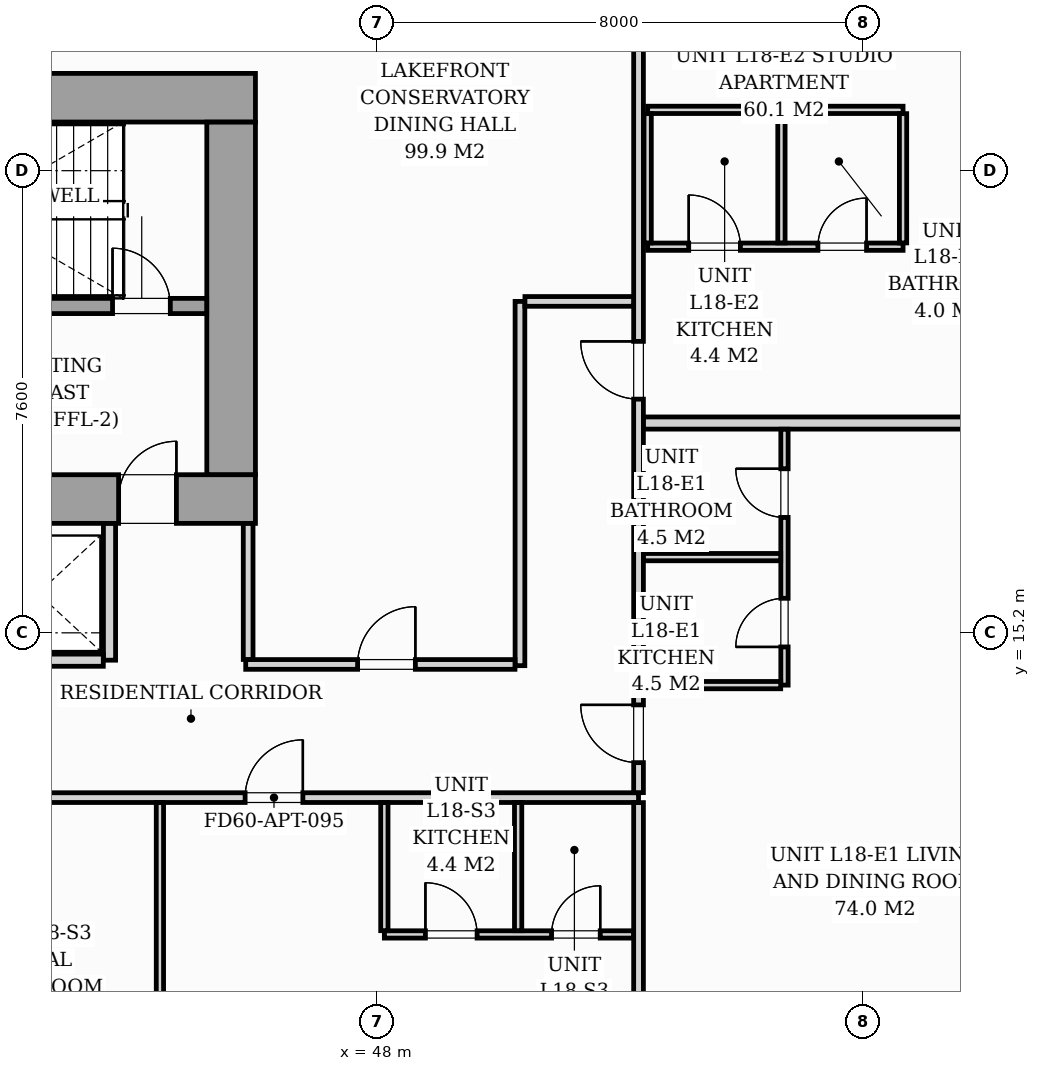
"""IFC4 building model, lengths in metres.
Left out: names, types, materials, properties, quantities, classifications, styles, units other than length and angle.
Written with IfcOpenShell. Run it as: python <this file> out.ifc"""

import sys

from ifc_helpers import new_model, si_unit, direction, frame, frame_2d, origin, origin_2d, place, context, subcontext, project, spatial, rectangle, i_section, extrude, source, transform, mapped, element, fill, save


model = new_model("IFC4")
c1 = context("Model", 3, precision=1e-05, world=origin(), true_north=direction((0.0, 1.0)))
c2 = subcontext(c1, "Body", "Model", "MODEL_VIEW")
j1 = project(units=[si_unit("LENGTHUNIT", "METRE"), si_unit("PLANEANGLEUNIT", "RADIAN")], contexts=[c1])
p1 = place(None, origin())
s1 = spatial("IfcSite", under=j1, at=p1, CompositionType="ELEMENT")
p2 = place(p1, origin())
s2 = spatial("IfcBuilding", under=s1, at=p2, CompositionType="ELEMENT")
p3 = place(p2, frame((0.0, 0.0, 64.6)))
s3 = spatial("IfcBuildingStorey", under=s2, at=p3, CompositionType="ELEMENT", Elevation=64.6)
m1 = source(origin(), c2, "Body", "SweptSolid", [
    extrude(i_section(OverallWidth=0.437, OverallDepth=0.514, WebThickness=0.061, FlangeThickness=0.097, FilletRadius=0.018, at=origin_2d()), origin(), (0.0, 0.0, 1.0), 3.196),
])
for number, where, z_axis, x_axis in (
    (1, (45.6, 17.4, 0.002), (0.0, 0.0, 1.0), (1.0, 0.0, 0.0)),
    (2, (45.6, 24.0, 0.002), (0.0, 0.0, 1.0), (1.0, 0.0, 0.0)),
):
    element("IfcColumn", number, at=place(p3, frame(where, z_axis=z_axis, x_axis=x_axis)), inside=s3, PredefinedType="PILASTER", context=c2, shape_type="MappedRepresentation", body=[
        mapped(m1, transform((0.0, 0.0, 0.0), scale=1.0)),
    ])
p4 = place(p3, frame((26.0, 17.4, 0.0), z_axis=(0.0, 0.0, 1.0), x_axis=(1.0, 0.0, 0.0)))
e3 = element("IfcWall", 3, at=p4, inside=s3, PredefinedType="SHEAR", context=c2, shape_type="SweptSolid", body=[
    extrude(rectangle(XDim=20.0, YDim=0.8, at=frame_2d((10.0, 0.0))), origin(), (0.0, 0.0, 1.0), 3.2),
])
p5 = place(p4, frame((1.15, 0.0, 0.0)))
e4 = element("IfcOpeningElement", 4, at=p5, cuts=e3, PredefinedType="OPENING", context=c2, shape_type="SweptSolid", body=[
    extrude(rectangle(XDim=0.95, YDim=2.06, at=frame_2d((0.475, 1.03))), frame((0.0, 0.41, 0.0), z_axis=(0.0, -1.0, 0.0), x_axis=(1.0, 0.0, 0.0)), (0.0, 0.0, 1.0), 0.82),
])
p6 = place(p4, frame((9.58, 0.0, 0.0)))
e5 = element("IfcOpeningElement", 5, at=p6, cuts=e3, PredefinedType="OPENING", context=c2, shape_type="SweptSolid", body=[
    extrude(rectangle(XDim=0.85, YDim=2.0, at=frame_2d((0.425, 1.0))), frame((0.0, 0.41, 0.0), z_axis=(0.0, -1.0, 0.0), x_axis=(1.0, 0.0, 0.0)), (0.0, 0.0, 1.0), 0.82),
])
p7 = place(p4, frame((17.75, 0.0, 0.0)))
e6 = element("IfcOpeningElement", 6, at=p7, cuts=e3, PredefinedType="OPENING", context=c2, shape_type="SweptSolid", body=[
    extrude(rectangle(XDim=0.95, YDim=2.06, at=frame_2d((0.475, 1.03))), frame((0.0, 0.41, 0.0), z_axis=(0.0, -1.0, 0.0), x_axis=(1.0, 0.0, 0.0)), (0.0, 0.0, 1.0), 0.82),
])
p8 = place(p3, frame((26.0, 24.0, 0.0), z_axis=(0.0, 0.0, 1.0), x_axis=(1.0, 0.0, 0.0)))
e7 = element("IfcWall", 7, at=p8, inside=s3, PredefinedType="SHEAR", context=c2, shape_type="SweptSolid", body=[
    extrude(rectangle(XDim=20.0, YDim=0.8, at=frame_2d((10.0, 0.0))), origin(), (0.0, 0.0, 1.0), 3.2),
])
p9 = place(p3, frame((45.6, 17.802, 0.0), z_axis=(0.0, 0.0, 1.0), x_axis=(0.0, 1.0, 0.0)))
e8 = element("IfcWall", 8, at=p9, inside=s3, PredefinedType="SHEAR", context=c2, shape_type="SweptSolid", body=[
    extrude(rectangle(XDim=5.796, YDim=0.8, at=frame_2d((2.898, 0.0))), origin(), (0.0, 0.0, 1.0), 3.2),
])
p10 = place(p3, frame((37.05, 20.575, 0.0), z_axis=(0.0, 0.0, 1.0), x_axis=(1.0, 0.0, 0.0)))
e9 = element("IfcWall", 9, at=p10, inside=s3, PredefinedType="SOLIDWALL", context=c2, shape_type="SweptSolid", body=[
    extrude(rectangle(XDim=8.148, YDim=0.25, at=frame_2d((4.074, 0.0))), origin(), (0.0, 0.0, 1.0), 3.2),
])
p11 = place(p10, frame((6.6, 0.0, 0.0)))
e10 = element("IfcOpeningElement", 10, at=p11, cuts=e9, PredefinedType="OPENING", context=c2, shape_type="SweptSolid", body=[
    extrude(rectangle(XDim=0.95, YDim=2.06, at=frame_2d((0.475, 1.03))), frame((0.0, 0.135, 0.0), z_axis=(0.0, -1.0, 0.0), x_axis=(1.0, 0.0, 0.0)), (0.0, 0.0, 1.0), 0.27),
])
p12 = place(p3, frame((43.6, 14.75, 0.0), z_axis=(0.0, 0.0, 1.0), x_axis=(0.0, 1.0, 0.0)))
e11 = element("IfcWall", 11, at=p12, inside=s3, PredefinedType="PARTITIONING", context=c2, shape_type="SweptSolid", body=[
    extrude(rectangle(XDim=2.248, YDim=0.2, at=frame_2d((1.124, 0.0))), origin(), (0.0, 0.0, 1.0), 2.9),
])
p13 = place(p3, frame((41.352, 14.75, 0.0), z_axis=(0.0, 0.0, 1.0), x_axis=(1.0, 0.0, 0.0)))
e12 = element("IfcWall", 12, at=p13, inside=s3, PredefinedType="PARTITIONING", context=c2, shape_type="SweptSolid", body=[
    extrude(rectangle(XDim=2.146, YDim=0.2, at=frame_2d((1.073, 0.0))), origin(), (0.0, 0.0, 1.0), 2.9),
])
p14 = place(p3, frame((15.2, 12.49, 0.0), z_axis=(0.0, 0.0, 1.0), x_axis=(1.0, 0.0, 0.0)))
e13 = element("IfcWall", 13, at=p14, inside=s3, PredefinedType="PARTITIONING", context=c2, shape_type="SweptSolid", body=[
    extrude(rectangle(XDim=37.1, YDim=0.16, at=frame_2d((18.55, 0.0))), origin(), (0.0, 0.0, 1.0), 2.9),
])
p15 = place(p14, frame((5.863, 0.0, 0.0)))
e14 = element("IfcOpeningElement", 14, at=p15, cuts=e13, PredefinedType="OPENING", context=c2, shape_type="SweptSolid", body=[
    extrude(rectangle(XDim=0.95, YDim=2.06, at=frame_2d((0.475, 1.03))), frame((0.0, 0.09, 0.0), z_axis=(0.0, -1.0, 0.0), x_axis=(1.0, 0.0, 0.0)), (0.0, 0.0, 1.0), 0.18),
])
p16 = place(p14, frame((18.25, 0.0, 0.0)))
e15 = element("IfcOpeningElement", 15, at=p16, cuts=e13, PredefinedType="OPENING", context=c2, shape_type="SweptSolid", body=[
    extrude(rectangle(XDim=0.95, YDim=2.06, at=frame_2d((0.475, 1.03))), frame((0.0, 0.09, 0.0), z_axis=(0.0, -1.0, 0.0), x_axis=(1.0, 0.0, 0.0)), (0.0, 0.0, 1.0), 0.18),
])
p17 = place(p14, frame((30.63, 0.0, 0.0)))
e16 = element("IfcOpeningElement", 16, at=p17, cuts=e13, PredefinedType="OPENING", context=c2, shape_type="SweptSolid", body=[
    extrude(rectangle(XDim=0.95, YDim=2.06, at=frame_2d((0.475, 1.03))), frame((0.0, 0.09, 0.0), z_axis=(0.0, -1.0, 0.0), x_axis=(1.0, 0.0, 0.0)), (0.0, 0.0, 1.0), 0.18),
])
p18 = place(p3, frame((52.3, 2.962, 0.0), z_axis=(0.0, 0.0, 1.0), x_axis=(0.0, 1.0, 0.0)))
e17 = element("IfcWall", 17, at=p18, inside=s3, PredefinedType="PARTITIONING", context=c2, shape_type="SweptSolid", body=[
    extrude(rectangle(XDim=9.446, YDim=0.16, at=frame_2d((4.723, 0.0))), origin(), (0.0, 0.0, 1.0), 2.9),
])
p19 = place(p3, frame((52.3, 12.572, 0.0), z_axis=(0.0, 0.0, 1.0), x_axis=(0.0, 1.0, 0.0)))
e18 = element("IfcWall", 18, at=p19, inside=s3, PredefinedType="PARTITIONING", context=c2, shape_type="SweptSolid", body=[
    extrude(rectangle(XDim=14.866, YDim=0.16, at=frame_2d((7.433, 0.0))), origin(), (0.0, 0.0, 1.0), 2.9),
])
p20 = place(p19, frame((0.493, 0.0, 0.0)))
e19 = element("IfcOpeningElement", 19, at=p20, cuts=e18, PredefinedType="OPENING", context=c2, shape_type="SweptSolid", body=[
    extrude(rectangle(XDim=0.95, YDim=2.06, at=frame_2d((0.475, 1.03))), frame((0.0, 0.09, 0.0), z_axis=(0.0, -1.0, 0.0), x_axis=(1.0, 0.0, 0.0)), (0.0, 0.0, 1.0), 0.18),
])
p21 = place(p19, frame((6.471, 0.0, 0.0)))
e20 = element("IfcOpeningElement", 20, at=p21, cuts=e18, PredefinedType="OPENING", context=c2, shape_type="SweptSolid", body=[
    extrude(rectangle(XDim=0.95, YDim=2.06, at=frame_2d((0.475, 1.03))), frame((0.0, 0.09, 0.0), z_axis=(0.0, -1.0, 0.0), x_axis=(1.0, 0.0, 0.0)), (0.0, 0.0, 1.0), 0.18),
])
p22 = place(p3, frame((48.12, 10.24, 0.0), z_axis=(0.0, 0.0, 1.0), x_axis=(1.0, 0.0, 0.0)))
e21 = element("IfcWall", 21, at=p22, inside=s3, PredefinedType="PARTITIONING", context=c2, shape_type="SweptSolid", body=[
    extrude(rectangle(XDim=4.098, YDim=0.12, at=frame_2d((2.049, 0.0))), origin(), (0.0, 0.0, 1.0), 2.9),
])
p23 = place(p22, frame((0.675, 0.0, 0.0)))
e22 = element("IfcOpeningElement", 22, at=p23, cuts=e21, PredefinedType="OPENING", context=c2, shape_type="SweptSolid", body=[
    extrude(rectangle(XDim=0.85, YDim=2.05, at=frame_2d((0.425, 1.025))), frame((0.0, 0.07, 0.0), z_axis=(0.0, -1.0, 0.0), x_axis=(1.0, 0.0, 0.0)), (0.0, 0.0, 1.0), 0.14),
])
p24 = place(p22, frame((2.75, 0.0, 0.0)))
e23 = element("IfcOpeningElement", 23, at=p24, cuts=e21, PredefinedType="OPENING", context=c2, shape_type="SweptSolid", body=[
    extrude(rectangle(XDim=0.8, YDim=2.02, at=frame_2d((0.4, 1.01))), frame((0.0, 0.07, 0.0), z_axis=(0.0, -1.0, 0.0), x_axis=(1.0, 0.0, 0.0)), (0.0, 0.0, 1.0), 0.14),
])
for number, where, z_axis, x_axis in (
    (24, (48.12, 10.302, 0.0), (0.0, 0.0, 1.0), (0.0, 1.0, 0.0)),
    (25, (50.32, 10.302, 0.0), (0.0, 0.0, 1.0), (0.0, 1.0, 0.0)),
):
    element("IfcWall", number, at=place(p3, frame(where, z_axis=z_axis, x_axis=x_axis)), inside=s3, PredefinedType="PARTITIONING", context=c2, shape_type="SweptSolid", body=[
        extrude(rectangle(XDim=2.106, YDim=0.12, at=frame_2d((1.053, 0.0))), origin(), (0.0, 0.0, 1.0), 2.9),
    ])
p25 = place(p3, frame((44.429, 2.962, 0.0), z_axis=(0.0, 0.0, 1.0), x_axis=(0.0, 1.0, 0.0)))
e26 = element("IfcWall", 26, at=p25, inside=s3, PredefinedType="PARTITIONING", context=c2, shape_type="SweptSolid", body=[
    extrude(rectangle(XDim=9.446, YDim=0.12, at=frame_2d((4.723, 0.0))), origin(), (0.0, 0.0, 1.0), 2.096),
])
p26 = place(p25, frame((4.288, 0.0, 0.0)))
e27 = element("IfcOpeningElement", 27, at=p26, cuts=e26, PredefinedType="OPENING", context=c2, shape_type="SweptSolid", body=[
    extrude(rectangle(XDim=0.85, YDim=2.01, at=frame_2d((0.425, 1.005))), frame((0.0, 0.07, 0.0), z_axis=(0.0, -1.0, 0.0), x_axis=(1.0, 0.0, 0.0)), (0.0, 0.0, 1.0), 0.14),
])
p27 = place(p3, frame((52.382, 18.65, 0.0), z_axis=(0.0, 0.0, 1.0), x_axis=(1.0, 0.0, 0.0)))
e28 = element("IfcWall", 28, at=p27, inside=s3, PredefinedType="PARTITIONING", context=c2, shape_type="SweptSolid", body=[
    extrude(rectangle(XDim=7.338, YDim=0.2, at=frame_2d((3.669, 0.0))), origin(), (0.0, 0.0, 1.0), 2.9),
])
p28 = place(p3, frame((54.7, 14.34, 0.0), z_axis=(0.0, 0.0, 1.0), x_axis=(0.0, 1.0, 0.0)))
e29 = element("IfcWall", 29, at=p28, inside=s3, PredefinedType="PARTITIONING", context=c2, shape_type="SweptSolid", body=[
    extrude(rectangle(XDim=4.208, YDim=0.12, at=frame_2d((2.104, 0.0))), origin(), (0.0, 0.0, 1.0), 2.005),
])
p29 = place(p28, frame((0.628, 0.0, 0.0)))
e30 = element("IfcOpeningElement", 30, at=p29, cuts=e29, PredefinedType="OPENING", context=c2, shape_type="SweptSolid", body=[
    extrude(rectangle(XDim=0.8, YDim=2.0, at=frame_2d((0.4, 1.0))), frame((0.0, 0.07, 0.0), z_axis=(0.0, -1.0, 0.0), x_axis=(1.0, 0.0, 0.0)), (0.0, 0.0, 1.0), 0.14),
])
p30 = place(p28, frame((2.758, 0.0, 0.0)))
e31 = element("IfcOpeningElement", 31, at=p30, cuts=e29, PredefinedType="OPENING", context=c2, shape_type="SweptSolid", body=[
    extrude(rectangle(XDim=0.8, YDim=2.0, at=frame_2d((0.4, 1.0))), frame((0.0, 0.07, 0.0), z_axis=(0.0, -1.0, 0.0), x_axis=(1.0, 0.0, 0.0)), (0.0, 0.0, 1.0), 0.14),
])
p31 = place(p3, frame((52.382, 16.445, 0.0), z_axis=(0.0, 0.0, 1.0), x_axis=(1.0, 0.0, 0.0)))
e32 = element("IfcWall", 32, at=p31, inside=s3, PredefinedType="PARTITIONING", context=c2, shape_type="SweptSolid", body=[
    extrude(rectangle(XDim=2.256, YDim=0.12, at=frame_2d((1.128, 0.0))), origin(), (0.0, 0.0, 1.0), 2.005),
])
p32 = place(p3, frame((52.382, 14.34, 0.0), z_axis=(0.0, 0.0, 1.0), x_axis=(1.0, 0.0, 0.0)))
e33 = element("IfcWall", 33, at=p32, inside=s3, PredefinedType="PARTITIONING", context=c2, shape_type="SweptSolid", body=[
    extrude(rectangle(XDim=2.256, YDim=0.12, at=frame_2d((1.128, 0.0))), origin(), (0.0, 0.0, 1.0), 2.9),
])
p33 = place(p3, frame((52.45, 21.55, 0.0), z_axis=(0.0, 0.0, 1.0), x_axis=(1.0, 0.0, 0.0)))
e34 = element("IfcWall", 34, at=p33, inside=s3, PredefinedType="PARTITIONING", context=c2, shape_type="SweptSolid", body=[
    extrude(rectangle(XDim=4.2, YDim=0.12, at=frame_2d((2.1, 0.0))), origin(), (0.0, 0.0, 1.0), 2.9),
])
p34 = place(p33, frame((0.675, 0.0, 0.0)))
e35 = element("IfcOpeningElement", 35, at=p34, cuts=e34, PredefinedType="OPENING", context=c2, shape_type="SweptSolid", body=[
    extrude(rectangle(XDim=0.85, YDim=2.05, at=frame_2d((0.425, 1.025))), frame((0.0, 0.07, 0.0), z_axis=(0.0, -1.0, 0.0), x_axis=(1.0, 0.0, 0.0)), (0.0, 0.0, 1.0), 0.14),
])
p35 = place(p33, frame((2.8, 0.0, 0.0)))
e36 = element("IfcOpeningElement", 36, at=p35, cuts=e34, PredefinedType="OPENING", context=c2, shape_type="SweptSolid", body=[
    extrude(rectangle(XDim=0.8, YDim=2.0, at=frame_2d((0.4, 1.0))), frame((0.0, 0.07, 0.0), z_axis=(0.0, -1.0, 0.0), x_axis=(1.0, 0.0, 0.0)), (0.0, 0.0, 1.0), 0.14),
])
p36 = place(p3, frame((52.45, 23.8, 0.0), z_axis=(0.0, 0.0, 1.0), x_axis=(1.0, 0.0, 0.0)))
e37 = element("IfcWall", 37, at=p36, inside=s3, PredefinedType="PARTITIONING", context=c2, shape_type="SweptSolid", body=[
    extrude(rectangle(XDim=4.2, YDim=0.12, at=frame_2d((2.1, 0.0))), origin(), (0.0, 0.0, 1.0), 2.9),
])
for number, where, z_axis, x_axis in (
    (38, (52.45, 21.612, 0.0), (0.0, 0.0, 1.0), (0.0, 1.0, 0.0)),
    (39, (54.65, 21.612, 0.0), (0.0, 0.0, 1.0), (0.0, 1.0, 0.0)),
    (40, (56.65, 21.612, 0.0), (0.0, 0.0, 1.0), (0.0, 1.0, 0.0)),
):
    element("IfcWall", number, at=place(p3, frame(where, z_axis=z_axis, x_axis=x_axis)), inside=s3, PredefinedType="PARTITIONING", context=c2, shape_type="SweptSolid", body=[
        extrude(rectangle(XDim=2.126, YDim=0.12, at=frame_2d((1.063, 0.0))), origin(), (0.0, 0.0, 1.0), 2.9),
    ])
p37 = place(p3, frame((50.35, 14.66, 0.0), z_axis=(0.0, 0.0, 1.0), x_axis=(0.0, 1.0, 0.0)))
e41 = element("IfcWall", 41, at=p37, inside=s3, PredefinedType="PARTITIONING", context=c2, shape_type="SweptSolid", body=[
    extrude(rectangle(XDim=5.99, YDim=0.16, at=frame_2d((2.995, 0.0))), origin(), (0.0, 0.0, 1.0), 2.9),
])
p38 = place(p3, frame((50.432, 20.65, 0.0), z_axis=(0.0, 0.0, 1.0), x_axis=(1.0, 0.0, 0.0)))
e42 = element("IfcWall", 42, at=p38, inside=s3, PredefinedType="PARTITIONING", context=c2, shape_type="SweptSolid", body=[
    extrude(rectangle(XDim=1.786, YDim=0.16, at=frame_2d((0.893, 0.0))), origin(), (0.0, 0.0, 1.0), 2.9),
])
p39 = place(p3, frame((45.84, 14.68, 0.0), z_axis=(0.0, 0.0, 1.0), x_axis=(1.0, 0.0, 0.0)))
e43 = element("IfcWall", 43, at=p39, inside=s3, PredefinedType="PARTITIONING", context=c2, shape_type="SweptSolid", body=[
    extrude(rectangle(XDim=4.428, YDim=0.16, at=frame_2d((2.214, 0.0))), origin(), (0.0, 0.0, 1.0), 2.9),
])
p40 = place(p39, frame((1.84, 0.0, 0.0)))
e44 = element("IfcOpeningElement", 44, at=p40, cuts=e43, PredefinedType="OPENING", context=c2, shape_type="SweptSolid", body=[
    extrude(rectangle(XDim=0.95, YDim=2.06, at=frame_2d((0.475, 1.03))), frame((0.0, 0.09, 0.0), z_axis=(0.0, -1.0, 0.0), x_axis=(1.0, 0.0, 0.0)), (0.0, 0.0, 1.0), 0.18),
])
p41 = place(p3, frame((45.88, 14.762, 0.0), z_axis=(0.0, 0.0, 1.0), x_axis=(0.0, 1.0, 0.0)))
e45 = element("IfcWall", 45, at=p41, inside=s3, PredefinedType="PARTITIONING", context=c2, shape_type="SweptSolid", body=[
    extrude(rectangle(XDim=2.236, YDim=0.16, at=frame_2d((1.118, 0.0))), origin(), (0.0, 0.0, 1.0), 2.9),
])
m2 = source(origin(), c2, "Body", "SweptSolid", [
    extrude(rectangle(XDim=0.95, YDim=2.06, at=frame_2d((0.475, 1.03))), frame((0.0, 0.025, 0.0), z_axis=(0.0, -1.0, 0.0), x_axis=(1.0, 0.0, 0.0)), (0.0, 0.0, 1.0), 0.05),
])
p42 = place(p7, origin())
e46 = element("IfcDoor", 46, at=p42, inside=s3, OperationType="SINGLE_SWING_RIGHT", PredefinedType="DOOR", context=c2, shape_type="MappedRepresentation", body=[
    mapped(m2, transform((0.0, 0.0, 0.0), scale=1.0)),
])
fill(e6, e46)
p43 = place(p11, origin())
e47 = element("IfcDoor", 47, at=p43, inside=s3, OperationType="SINGLE_SWING_LEFT", PredefinedType="DOOR", context=c2, shape_type="MappedRepresentation", body=[
    mapped(m2, transform((0.0, 0.0, 0.0), scale=1.0)),
])
fill(e10, e47)
m3 = source(origin(), c2, "Body", "SweptSolid", [
    extrude(rectangle(XDim=0.95, YDim=2.06, at=frame_2d((0.475, 1.03))), frame((0.0, 0.025, 0.0), z_axis=(0.0, -1.0, 0.0), x_axis=(1.0, 0.0, 0.0)), (0.0, 0.0, 1.0), 0.05),
])
p44 = place(p17, origin())
e48 = element("IfcDoor", 48, at=p44, inside=s3, OperationType="SINGLE_SWING_RIGHT", PredefinedType="DOOR", context=c2, shape_type="MappedRepresentation", body=[
    mapped(m3, transform((0.0, 0.0, 0.0), scale=1.0)),
])
fill(e16, e48)
m4 = source(origin(), c2, "Body", "SweptSolid", [
    extrude(rectangle(XDim=0.85, YDim=2.05, at=frame_2d((0.425, 1.025))), frame((0.0, 0.025, 0.0), z_axis=(0.0, -1.0, 0.0), x_axis=(1.0, 0.0, 0.0)), (0.0, 0.0, 1.0), 0.05),
])
p45 = place(p23, origin())
e49 = element("IfcDoor", 49, at=p45, inside=s3, OperationType="SINGLE_SWING_LEFT", PredefinedType="DOOR", context=c2, shape_type="MappedRepresentation", body=[
    mapped(m4, transform((0.0, 0.0, 0.0), scale=1.0)),
])
fill(e22, e49)
m5 = source(origin(), c2, "Body", "SweptSolid", [
    extrude(rectangle(XDim=0.8, YDim=2.02, at=frame_2d((0.4, 1.01))), frame((0.0, 0.025, 0.0), z_axis=(0.0, -1.0, 0.0), x_axis=(1.0, 0.0, 0.0)), (0.0, 0.0, 1.0), 0.05),
])
p46 = place(p24, origin())
e50 = element("IfcDoor", 50, at=p46, inside=s3, OperationType="SINGLE_SWING_RIGHT", PredefinedType="DOOR", context=c2, shape_type="MappedRepresentation", body=[
    mapped(m5, transform((0.0, 0.0, 0.0), scale=1.0)),
])
fill(e23, e50)
p47 = place(p20, origin())
e51 = element("IfcDoor", 51, at=p47, inside=s3, OperationType="SINGLE_SWING_RIGHT", PredefinedType="DOOR", context=c2, shape_type="MappedRepresentation", body=[
    mapped(m3, transform((0.0, 0.0, 0.0), scale=1.0)),
])
fill(e19, e51)
m6 = source(origin(), c2, "Body", "SweptSolid", [
    extrude(rectangle(XDim=0.8, YDim=2.0, at=frame_2d((0.4, 1.0))), frame((0.0, 0.025, 0.0), z_axis=(0.0, -1.0, 0.0), x_axis=(1.0, 0.0, 0.0)), (0.0, 0.0, 1.0), 0.05),
])
p48 = place(p29, origin())
e52 = element("IfcDoor", 52, at=p48, inside=s3, OperationType="SINGLE_SWING_LEFT", PredefinedType="DOOR", context=c2, shape_type="MappedRepresentation", body=[
    mapped(m6, transform((0.0, 0.0, 0.0), scale=1.0)),
])
fill(e30, e52)
p49 = place(p30, origin())
e53 = element("IfcDoor", 53, at=p49, inside=s3, OperationType="SINGLE_SWING_RIGHT", PredefinedType="DOOR", context=c2, shape_type="MappedRepresentation", body=[
    mapped(m6, transform((0.0, 0.0, 0.0), scale=1.0)),
])
fill(e31, e53)
p50 = place(p21, origin())
e54 = element("IfcDoor", 54, at=p50, inside=s3, OperationType="SINGLE_SWING_RIGHT", PredefinedType="DOOR", context=c2, shape_type="MappedRepresentation", body=[
    mapped(m3, transform((0.0, 0.0, 0.0), scale=1.0)),
])
fill(e20, e54)
p51 = place(p34, origin())
e55 = element("IfcDoor", 55, at=p51, inside=s3, OperationType="SINGLE_SWING_LEFT", PredefinedType="DOOR", context=c2, shape_type="MappedRepresentation", body=[
    mapped(m4, transform((0.0, 0.0, 0.0), scale=1.0)),
])
fill(e35, e55)
p52 = place(p35, origin())
e56 = element("IfcDoor", 56, at=p52, inside=s3, OperationType="SINGLE_SWING_RIGHT", PredefinedType="DOOR", context=c2, shape_type="MappedRepresentation", body=[
    mapped(m6, transform((0.0, 0.0, 0.0), scale=1.0)),
])
fill(e36, e56)
p53 = place(p40, origin())
e57 = element("IfcDoor", 57, at=p53, inside=s3, OperationType="SINGLE_SWING_RIGHT", PredefinedType="DOOR", context=c2, shape_type="MappedRepresentation", body=[
    mapped(m3, transform((0.0, 0.0, 0.0), scale=1.0)),
])
fill(e44, e57)
save(model, sys.argv[1])
